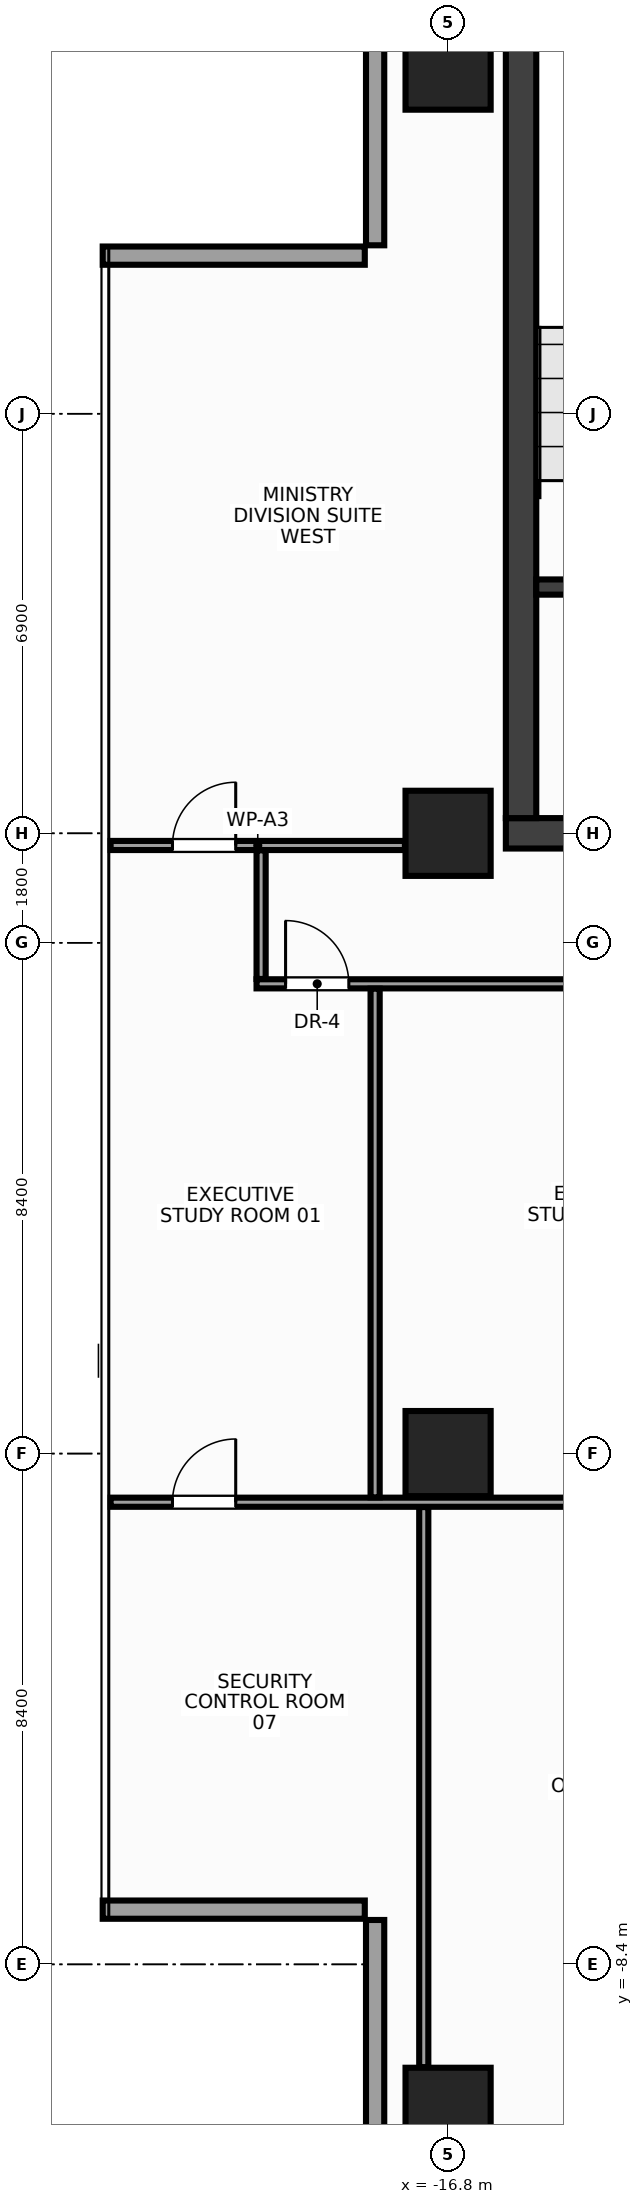
"""IFC4 building model, lengths in metres.
Left out: names, types, materials, properties, quantities, classifications, styles, units other than length and angle.
Written with IfcOpenShell. Run it as: python <this file> out.ifc"""

import sys

from ifc_helpers import new_model, si_unit, direction, frame, frame_2d, origin, origin_2d, place, context, subcontext, project, spatial, rectangle, extrude, source, transform, mapped, element, fill, save


model = new_model("IFC4")
c1 = context("Model", 3, precision=1e-05, world=origin(), true_north=direction((0.0, 1.0)))
c2 = subcontext(c1, "Body", "Model", "MODEL_VIEW")
j1 = project(units=[si_unit("LENGTHUNIT", "METRE"), si_unit("PLANEANGLEUNIT", "RADIAN")], contexts=[c1])
p1 = place(None, origin())
s1 = spatial("IfcSite", under=j1, at=p1, CompositionType="ELEMENT")
p2 = place(p1, origin())
s2 = spatial("IfcBuilding", under=s1, at=p2, CompositionType="ELEMENT")
p3 = place(p2, frame((0.0, 0.0, 246.8)))
s3 = spatial("IfcBuildingStorey", under=s2, at=p3, CompositionType="ELEMENT", Elevation=246.8)
m1 = source(origin(), c2, "Body", "SweptSolid", [
    extrude(rectangle(XDim=31.7, YDim=0.5, at=frame_2d((15.85, 0.0))), origin(), (0.0, 0.0, 1.0), 3.6),
])
p4 = place(p3, frame((-15.85, 10.2, 0.0), z_axis=(0.0, 0.0, 1.0), x_axis=(1.0, 0.0, 0.0)))
e1 = element("IfcWall", 1, at=p4, inside=s3, PredefinedType="SHEAR", context=c2, shape_type="MappedRepresentation", body=[
    mapped(m1, transform((0.0, 0.0, 0.0), x_axis=(1.0, 0.0, 0.0), y_axis=(0.0, 1.0, 0.0), z_axis=(0.0, 0.0, 1.0), scale=1.0)),
])
p5 = place(p4, frame((1.7, 0.0, 0.0)))
e2 = element("IfcOpeningElement", 2, at=p5, cuts=e1, PredefinedType="OPENING", context=c2, shape_type="SweptSolid", body=[
    extrude(rectangle(XDim=1.6, YDim=2.15, at=frame_2d((0.8, 1.075))), frame((0.0, 0.262, 0.0), z_axis=(0.0, -1.0, 0.0), x_axis=(1.0, 0.0, 0.0)), (0.0, 0.0, 1.0), 0.524),
])
p6 = place(p4, frame((28.4, 0.0, 0.0)))
e3 = element("IfcOpeningElement", 3, at=p6, cuts=e1, PredefinedType="OPENING", context=c2, shape_type="SweptSolid", body=[
    extrude(rectangle(XDim=1.6, YDim=2.15, at=frame_2d((0.8, 1.075))), frame((0.0, 0.262, 0.0), z_axis=(0.0, -1.0, 0.0), x_axis=(1.0, 0.0, 0.0)), (0.0, 0.0, 1.0), 0.524),
])
p7 = place(p4, frame((15.1, 0.0, 0.0)))
e4 = element("IfcOpeningElement", 4, at=p7, cuts=e1, PredefinedType="OPENING", context=c2, shape_type="SweptSolid", body=[
    extrude(rectangle(XDim=1.5, YDim=2.2, at=frame_2d((0.75, 1.1))), frame((0.0, 0.262, 0.0), z_axis=(0.0, -1.0, 0.0), x_axis=(1.0, 0.0, 0.0)), (0.0, 0.0, 1.0), 0.524),
])
m2 = source(origin(), c2, "Body", "SweptSolid", [
    extrude(rectangle(XDim=13.1, YDim=0.5, at=frame_2d((6.55, 0.0))), origin(), (0.0, 0.0, 1.0), 3.6),
])
p8 = place(p3, frame((-15.6, 10.45, 0.0), z_axis=(0.0, 0.0, 1.0), x_axis=(0.0, 1.0, 0.0)))
e5 = element("IfcWall", 5, at=p8, inside=s3, PredefinedType="SHEAR", context=c2, shape_type="MappedRepresentation", body=[
    mapped(m2, transform((0.0, 0.0, 0.0), x_axis=(1.0, 0.0, 0.0), y_axis=(0.0, 1.0, 0.0), z_axis=(0.0, 0.0, 1.0), scale=1.0)),
])
m3 = source(origin(), c2, "Body", "SweptSolid", [
    extrude(rectangle(XDim=3.705, YDim=0.25, at=frame_2d((1.853, 0.0))), origin(), (0.0, 0.0, 1.0), 3.6),
])
p9 = place(p3, frame((-15.35, 14.25, 0.0), z_axis=(0.0, 0.0, 1.0), x_axis=(1.0, 0.0, 0.0)))
e6 = element("IfcWall", 6, at=p9, inside=s3, PredefinedType="SHEAR", context=c2, shape_type="MappedRepresentation", body=[
    mapped(m3, transform((0.0, 0.0, 0.0), x_axis=(1.0, 0.0, 0.0), y_axis=(0.0, 1.0, 0.0), z_axis=(0.0, 0.0, 1.0), scale=1.0)),
])
p10 = place(p9, frame((0.95, 0.0, 0.0)))
e7 = element("IfcOpeningElement", 7, at=p10, cuts=e6, PredefinedType="OPENING", context=c2, shape_type="SweptSolid", body=[
    extrude(rectangle(XDim=1.6, YDim=2.15, at=frame_2d((0.8, 1.075))), frame((0.0, 0.137, 0.0), z_axis=(0.0, -1.0, 0.0), x_axis=(1.0, 0.0, 0.0)), (0.0, 0.0, 1.0), 0.274),
])
m4 = source(origin(), c2, "Body", "SweptSolid", [
    extrude(rectangle(XDim=1.4, YDim=1.4, at=origin_2d()), origin(), (0.0, 0.0, 1.0), 3.6),
])
for number, where, z_axis, x_axis in (
    (8, (-16.8, -10.8, 0.0), (0.0, 0.0, 1.0), (1.0, 0.0, 0.0)),
    (9, (-16.8, 0.0, 0.0), (0.0, 0.0, 1.0), (1.0, 0.0, 0.0)),
    (10, (-16.8, 10.2, 0.0), (0.0, 0.0, 1.0), (1.0, 0.0, 0.0)),
    (11, (-16.8, 22.8, 0.0), (0.0, 0.0, 1.0), (1.0, 0.0, 0.0)),
):
    element("IfcColumn", number, at=place(p3, frame(where, z_axis=z_axis, x_axis=x_axis)), inside=s3, PredefinedType="COLUMN", context=c2, shape_type="MappedRepresentation", body=[
        mapped(m4, transform((0.0, 0.0, 0.0), x_axis=(1.0, 0.0, 0.0), y_axis=(0.0, 1.0, 0.0), z_axis=(0.0, 0.0, 1.0), scale=1.0)),
    ])
m5 = source(origin(), c2, "Body", "SweptSolid", [
    extrude(rectangle(XDim=4.31, YDim=0.3, at=frame_2d((2.155, 0.0))), origin(), (0.0, 0.0, 1.0), 2.75),
])
p11 = place(p3, frame((-18.0, 24.18, 0.0), z_axis=(0.0, 0.0, 1.0), x_axis=(0.0, -1.0, 0.0)))
e12 = element("IfcWall", 12, at=p11, inside=s3, PredefinedType="STANDARD", context=c2, shape_type="MappedRepresentation", body=[
    mapped(m5, transform((0.0, 0.0, 0.0), x_axis=(1.0, 0.0, 0.0), y_axis=(0.0, 1.0, 0.0), z_axis=(0.0, 0.0, 1.0), scale=1.0)),
])
m6 = source(origin(), c2, "Body", "SweptSolid", [
    extrude(rectangle(XDim=4.31, YDim=0.3, at=frame_2d((2.155, 0.0))), origin(), (0.0, 0.0, 1.0), 2.75),
])
for number, where, z_axis, x_axis in (
    (13, (-18.17, 19.7, 0.0), (0.0, 0.0, 1.0), (-1.0, 0.0, 0.0)),
    (14, (-22.48, -7.5, 0.0), (0.0, 0.0, 1.0), (1.0, 0.0, 0.0)),
    (15, (-18.0, -7.67, 0.0), (0.0, 0.0, 1.0), (0.0, -1.0, 0.0)),
):
    element("IfcWall", number, at=place(p3, frame(where, z_axis=z_axis, x_axis=x_axis)), inside=s3, PredefinedType="STANDARD", context=c2, shape_type="MappedRepresentation", body=[
        mapped(m6, transform((0.0, 0.0, 0.0), x_axis=(1.0, 0.0, 0.0), y_axis=(0.0, 1.0, 0.0), z_axis=(0.0, 0.0, 1.0), scale=1.0)),
    ])
m7 = source(origin(), c2, "Body", "SweptSolid", [
    extrude(rectangle(XDim=4.84, YDim=0.15, at=frame_2d((2.42, 0.0))), origin(), (0.0, 0.0, 1.0), 3.37),
])
p12 = place(p3, frame((-22.35, 10.0, 0.0), z_axis=(0.0, 0.0, 1.0), x_axis=(1.0, 0.0, 0.0)))
e16 = element("IfcWall", 16, at=p12, inside=s3, PredefinedType="PARTITIONING", context=c2, shape_type="MappedRepresentation", body=[
    mapped(m7, transform((0.0, 0.0, 0.0), x_axis=(1.0, 0.0, 0.0), y_axis=(0.0, 1.0, 0.0), z_axis=(0.0, 0.0, 1.0), scale=1.0)),
])
p13 = place(p12, frame((1.018, 0.0, 0.0)))
e17 = element("IfcOpeningElement", 17, at=p13, cuts=e16, PredefinedType="OPENING", context=c2, shape_type="SweptSolid", body=[
    extrude(rectangle(XDim=1.04, YDim=2.2, at=frame_2d((0.52, 1.1))), frame((0.0, 0.087, 0.0), z_axis=(0.0, -1.0, 0.0), x_axis=(1.0, 0.0, 0.0)), (0.0, 0.0, 1.0), 0.174),
])
m8 = source(origin(), c2, "Body", "SweptSolid", [
    extrude(rectangle(XDim=15.6, YDim=0.15, at=frame_2d((7.8, 0.0))), origin(), (0.0, 0.0, 1.0), 2.755),
])
p14 = place(p3, frame((-19.95, 7.725, 0.0), z_axis=(0.0, 0.0, 1.0), x_axis=(1.0, 0.0, 0.0)))
e18 = element("IfcWall", 18, at=p14, inside=s3, PredefinedType="PARTITIONING", context=c2, shape_type="MappedRepresentation", body=[
    mapped(m8, transform((0.0, 0.0, 0.0), x_axis=(1.0, 0.0, 0.0), y_axis=(0.0, 1.0, 0.0), z_axis=(0.0, 0.0, 1.0), scale=1.0)),
])
p15 = place(p14, frame((0.478, 0.0, 0.0)))
e19 = element("IfcOpeningElement", 19, at=p15, cuts=e18, PredefinedType="OPENING", context=c2, shape_type="SweptSolid", body=[
    extrude(rectangle(XDim=1.04, YDim=2.2, at=frame_2d((0.52, 1.1))), frame((0.0, 0.087, 0.0), z_axis=(0.0, -1.0, 0.0), x_axis=(1.0, 0.0, 0.0)), (0.0, 0.0, 1.0), 0.174),
])
p16 = place(p14, frame((5.63, 0.0, 0.0)))
e20 = element("IfcOpeningElement", 20, at=p16, cuts=e18, PredefinedType="OPENING", context=c2, shape_type="SweptSolid", body=[
    extrude(rectangle(XDim=1.04, YDim=2.2, at=frame_2d((0.52, 1.1))), frame((0.0, 0.087, 0.0), z_axis=(0.0, -1.0, 0.0), x_axis=(1.0, 0.0, 0.0)), (0.0, 0.0, 1.0), 0.174),
])
p17 = place(p14, frame((12.433, 0.0, 0.0)))
e21 = element("IfcOpeningElement", 21, at=p17, cuts=e18, PredefinedType="OPENING", context=c2, shape_type="SweptSolid", body=[
    extrude(rectangle(XDim=1.04, YDim=2.2, at=frame_2d((0.52, 1.1))), frame((0.0, 0.087, 0.0), z_axis=(0.0, -1.0, 0.0), x_axis=(1.0, 0.0, 0.0)), (0.0, 0.0, 1.0), 0.174),
])
m9 = source(origin(), c2, "Body", "SweptSolid", [
    extrude(rectangle(XDim=2.115, YDim=0.15, at=frame_2d((1.058, 0.0))), origin(), (0.0, 0.0, 1.0), 3.37),
])
p18 = place(p3, frame((-19.875, 7.805, 0.0), z_axis=(0.0, 0.0, 1.0), x_axis=(0.0, 1.0, 0.0)))
e22 = element("IfcWall", 22, at=p18, inside=s3, PredefinedType="PARTITIONING", context=c2, shape_type="MappedRepresentation", body=[
    mapped(m9, transform((0.0, 0.0, 0.0), x_axis=(1.0, 0.0, 0.0), y_axis=(0.0, 1.0, 0.0), z_axis=(0.0, 0.0, 1.0), scale=1.0)),
])
m10 = source(origin(), c2, "Body", "SweptSolid", [
    extrude(rectangle(XDim=17.995, YDim=0.15, at=frame_2d((8.998, 0.0))), origin(), (0.0, 0.0, 1.0), 2.755),
])
p19 = place(p3, frame((-22.35, -0.8, 0.0), z_axis=(0.0, 0.0, 1.0), x_axis=(1.0, 0.0, 0.0)))
e23 = element("IfcWall", 23, at=p19, inside=s3, PredefinedType="PARTITIONING", context=c2, shape_type="MappedRepresentation", body=[
    mapped(m10, transform((0.0, 0.0, 0.0), x_axis=(1.0, 0.0, 0.0), y_axis=(0.0, 1.0, 0.0), z_axis=(0.0, 0.0, 1.0), scale=1.0)),
])
p20 = place(p19, frame((1.018, 0.0, 0.0)))
e24 = element("IfcOpeningElement", 24, at=p20, cuts=e23, PredefinedType="OPENING", context=c2, shape_type="SweptSolid", body=[
    extrude(rectangle(XDim=1.04, YDim=2.2, at=frame_2d((0.52, 1.1))), frame((0.0, 0.087, 0.0), z_axis=(0.0, -1.0, 0.0), x_axis=(1.0, 0.0, 0.0)), (0.0, 0.0, 1.0), 0.174),
])
p21 = place(p19, frame((8.03, 0.0, 0.0)))
e25 = element("IfcOpeningElement", 25, at=p21, cuts=e23, PredefinedType="OPENING", context=c2, shape_type="SweptSolid", body=[
    extrude(rectangle(XDim=1.04, YDim=2.2, at=frame_2d((0.52, 1.1))), frame((0.0, 0.087, 0.0), z_axis=(0.0, -1.0, 0.0), x_axis=(1.0, 0.0, 0.0)), (0.0, 0.0, 1.0), 0.174),
])
m11 = source(origin(), c2, "Body", "SweptSolid", [
    extrude(rectangle(XDim=8.365, YDim=0.15, at=frame_2d((4.183, 0.0))), origin(), (0.0, 0.0, 1.0), 3.37),
])
p22 = place(p3, frame((-18.0, -0.72, 0.0), z_axis=(0.0, 0.0, 1.0), x_axis=(0.0, 1.0, 0.0)))
e26 = element("IfcWall", 26, at=p22, inside=s3, PredefinedType="PARTITIONING", context=c2, shape_type="MappedRepresentation", body=[
    mapped(m11, transform((0.0, 0.0, 0.0), x_axis=(1.0, 0.0, 0.0), y_axis=(0.0, 1.0, 0.0), z_axis=(0.0, 0.0, 1.0), scale=1.0)),
])
m12 = source(origin(), c2, "Body", "SweptSolid", [
    extrude(rectangle(XDim=9.21, YDim=0.15, at=frame_2d((4.605, 0.0))), origin(), (0.0, 0.0, 1.0), 3.37),
])
p23 = place(p3, frame((-17.2, -10.09, 0.0), z_axis=(0.0, 0.0, 1.0), x_axis=(0.0, 1.0, 0.0)))
e27 = element("IfcWall", 27, at=p23, inside=s3, PredefinedType="PARTITIONING", context=c2, shape_type="MappedRepresentation", body=[
    mapped(m12, transform((0.0, 0.0, 0.0), x_axis=(1.0, 0.0, 0.0), y_axis=(0.0, 1.0, 0.0), z_axis=(0.0, 0.0, 1.0), scale=1.0)),
])
m13 = source(origin(), c2, "Body", "SweptSolid", [
    extrude(rectangle(XDim=1.04, YDim=2.2, at=frame_2d((0.52, 1.1))), frame((0.0, 0.025, 0.0), z_axis=(0.0, -1.0, 0.0), x_axis=(1.0, 0.0, 0.0)), (0.0, 0.0, 1.0), 0.05),
])
p24 = place(p15, origin())
e28 = element("IfcDoor", 28, at=p24, inside=s3, OperationType="SINGLE_SWING_LEFT", PredefinedType="DOOR", context=c2, shape_type="MappedRepresentation", body=[
    mapped(m13, transform((0.0, 0.0, 0.0), x_axis=(1.0, 0.0, 0.0), y_axis=(0.0, 1.0, 0.0), z_axis=(0.0, 0.0, 1.0), scale=1.0)),
])
fill(e19, e28)
p25 = place(p13, origin())
e29 = element("IfcDoor", 29, at=p25, inside=s3, OperationType="SINGLE_SWING_RIGHT", PredefinedType="DOOR", context=c2, shape_type="MappedRepresentation", body=[
    mapped(m13, transform((0.0, 0.0, 0.0), x_axis=(1.0, 0.0, 0.0), y_axis=(0.0, 1.0, 0.0), z_axis=(0.0, 0.0, 1.0), scale=1.0)),
])
fill(e17, e29)
p26 = place(p20, origin())
e30 = element("IfcDoor", 30, at=p26, inside=s3, OperationType="SINGLE_SWING_RIGHT", PredefinedType="DOOR", context=c2, shape_type="MappedRepresentation", body=[
    mapped(m13, transform((0.0, 0.0, 0.0), x_axis=(1.0, 0.0, 0.0), y_axis=(0.0, 1.0, 0.0), z_axis=(0.0, 0.0, 1.0), scale=1.0)),
])
fill(e24, e30)
save(model, sys.argv[1])
